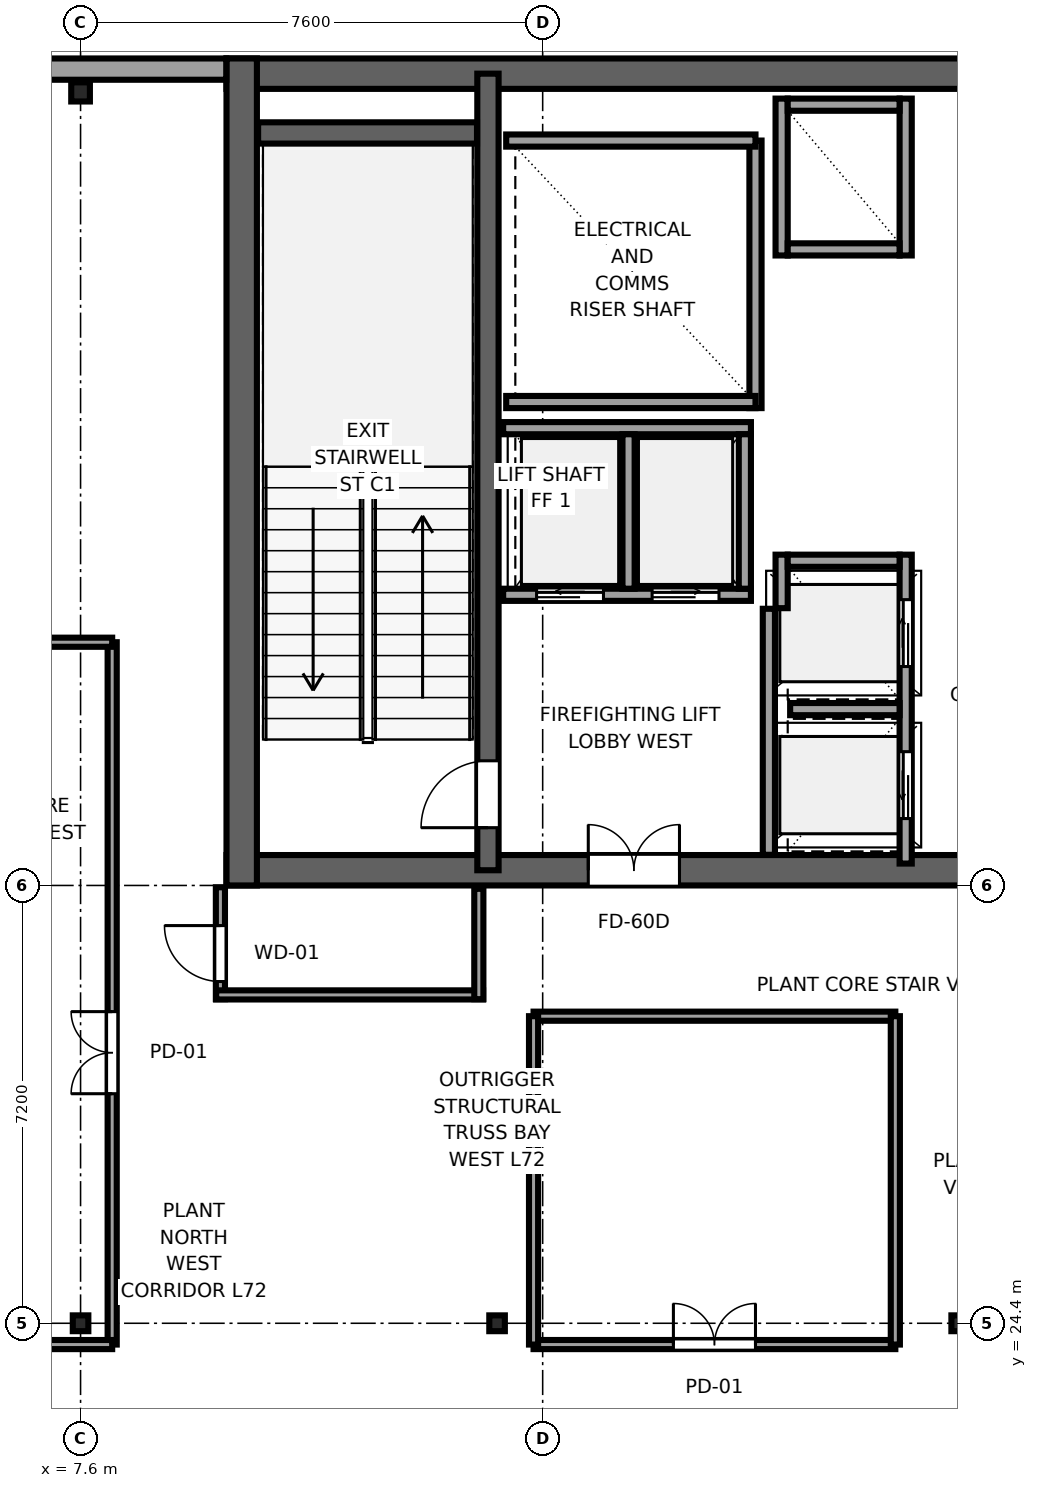
"""IFC4 building model, lengths in metres.
Left out: names, types, materials, properties, quantities, classifications, styles, units other than length and angle.
Written with IfcOpenShell. Run it as: python <this file> out.ifc"""

import sys

from ifc_helpers import new_model, si_unit, direction, frame, frame_2d, origin, origin_2d, place, context, subcontext, project, spatial, rectangle, i_section, extrude, source, transform, mapped, element, fill, save


model = new_model("IFC4")
c1 = context("Model", 3, precision=1e-05, world=origin(), true_north=direction((0.0, 1.0)))
c2 = subcontext(c1, "Body", "Model", "MODEL_VIEW")
j1 = project(units=[si_unit("LENGTHUNIT", "METRE"), si_unit("PLANEANGLEUNIT", "RADIAN")], contexts=[c1])
p1 = place(None, origin())
s1 = spatial("IfcSite", under=j1, at=p1, CompositionType="ELEMENT")
p2 = place(p1, origin())
s2 = spatial("IfcBuilding", under=s1, at=p2, CompositionType="ELEMENT")
p3 = place(p2, frame((0.0, 0.0, 270.05)))
s3 = spatial("IfcBuildingStorey", under=s2, at=p3, CompositionType="ELEMENT", Elevation=270.05)
p4 = place(p3, frame((10.0, 31.85, 0.0), z_axis=(0.0, 0.0, 1.0), x_axis=(1.0, 0.0, 0.0)))
e1 = element("IfcWall", 1, at=p4, inside=s3, PredefinedType="SHEAR", context=c2, shape_type="SweptSolid", body=[
    extrude(rectangle(XDim=26.0, YDim=0.5, at=frame_2d((13.0, 0.0))), origin(), (0.0, 0.0, 1.0), 5.0),
])
p5 = place(p4, frame((7.45, 0.0, 0.0), z_axis=(0.0, 0.0, 1.0), x_axis=(-1.0, 0.0, 0.0)))
e2 = element("IfcOpeningElement", 2, at=p5, cuts=e1, PredefinedType="OPENING", context=c2, shape_type="SweptSolid", body=[
    extrude(rectangle(XDim=1.5, YDim=2.04, at=frame_2d((0.75, 1.02))), frame((0.0, 0.26, 0.0), z_axis=(0.0, -1.0, 0.0), x_axis=(1.0, 0.0, 0.0)), (0.0, 0.0, 1.0), 0.52),
])
p6 = place(p4, frame((13.75, 0.0, 0.0), z_axis=(0.0, 0.0, 1.0), x_axis=(-1.0, 0.0, 0.0)))
e3 = element("IfcOpeningElement", 3, at=p6, cuts=e1, PredefinedType="OPENING", context=c2, shape_type="SweptSolid", body=[
    extrude(rectangle(XDim=1.5, YDim=2.04, at=frame_2d((0.75, 1.02))), frame((0.0, 0.26, 0.0), z_axis=(0.0, -1.0, 0.0), x_axis=(1.0, 0.0, 0.0)), (0.0, 0.0, 1.0), 0.52),
])
p7 = place(p4, frame((20.05, 0.0, 0.0), z_axis=(0.0, 0.0, 1.0), x_axis=(-1.0, 0.0, 0.0)))
e4 = element("IfcOpeningElement", 4, at=p7, cuts=e1, PredefinedType="OPENING", context=c2, shape_type="SweptSolid", body=[
    extrude(rectangle(XDim=1.5, YDim=2.04, at=frame_2d((0.75, 1.02))), frame((0.0, 0.26, 0.0), z_axis=(0.0, -1.0, 0.0), x_axis=(1.0, 0.0, 0.0)), (0.0, 0.0, 1.0), 0.52),
])
p8 = place(p3, frame((10.0, 44.95, 0.0), z_axis=(0.0, 0.0, 1.0), x_axis=(1.0, 0.0, 0.0)))
e5 = element("IfcWall", 5, at=p8, inside=s3, PredefinedType="SHEAR", context=c2, shape_type="SweptSolid", body=[
    extrude(rectangle(XDim=26.0, YDim=0.5, at=frame_2d((13.0, 0.0))), origin(), (0.0, 0.0, 1.0), 5.0),
])
p9 = place(p3, frame((10.25, 31.6, 0.0), z_axis=(0.0, 0.0, 1.0), x_axis=(0.0, 1.0, 0.0)))
e6 = element("IfcWall", 6, at=p9, inside=s3, PredefinedType="SHEAR", context=c2, shape_type="SweptSolid", body=[
    extrude(rectangle(XDim=13.6, YDim=0.5, at=frame_2d((6.8, 0.0))), origin(), (0.0, 0.0, 1.0), 5.0),
])
p10 = place(p3, frame((14.3, 31.85, 0.0), z_axis=(0.0, 0.0, 1.0), x_axis=(0.0, 1.0, 0.0)))
e7 = element("IfcWall", 7, at=p10, inside=s3, PredefinedType="SHEAR", context=c2, shape_type="SweptSolid", body=[
    extrude(rectangle(XDim=13.1, YDim=0.35, at=frame_2d((6.55, 0.0))), origin(), (0.0, 0.0, 1.0), 5.0),
])
p11 = place(p10, frame((0.7, 0.0, 0.0)))
e8 = element("IfcOpeningElement", 8, at=p11, cuts=e7, PredefinedType="OPENING", context=c2, shape_type="SweptSolid", body=[
    extrude(rectangle(XDim=1.1, YDim=2.12, at=frame_2d((0.55, 1.06))), frame((0.0, 0.185, 0.0), z_axis=(0.0, -1.0, 0.0), x_axis=(1.0, 0.0, 0.0)), (0.0, 0.0, 1.0), 0.37),
])
p12 = place(p3, frame((10.52, 43.975, 0.0), z_axis=(0.0, 0.0, 1.0), x_axis=(1.0, 0.0, 0.0)))
e9 = element("IfcWall", 9, at=p12, inside=s3, PredefinedType="SHEAR", context=c2, shape_type="SweptSolid", body=[
    extrude(rectangle(XDim=3.6, YDim=0.35, at=frame_2d((1.8, 0.0))), origin(), (0.0, 0.0, 1.0), 5.0),
])
m1 = source(origin(), c2, "Body", "SweptSolid", [
    extrude(i_section(OverallWidth=0.256, OverallDepth=0.26, WebThickness=0.01, FlangeThickness=0.017, FilletRadius=0.014, at=origin_2d()), origin(), (0.0, 0.0, 1.0), 5.0),
])
for number, where, z_axis, x_axis in (
    (10, (7.6, 24.4, 0.0), (0.0, 0.0, 1.0), (1.0, 0.0, 0.0)),
    (11, (14.45, 24.4, 0.0), (0.0, 0.0, 1.0), (1.0, 0.0, 0.0)),
    (12, (22.05, 24.4, 0.0), (0.0, 0.0, 1.0), (1.0, 0.0, 0.0)),
):
    element("IfcColumn", number, at=place(p3, frame(where, z_axis=z_axis, x_axis=x_axis)), inside=s3, PredefinedType="COLUMN", context=c2, shape_type="MappedRepresentation", body=[
        mapped(m1, transform((0.0, 0.0, 0.0), x_axis=(1.0, 0.0, 0.0), y_axis=(0.0, 1.0, 0.0), z_axis=(0.0, 0.0, 1.0), scale=1.0)),
    ])
m2 = source(origin(), c2, "Body", "SweptSolid", [
    extrude(i_section(OverallWidth=0.307, OverallDepth=0.315, WebThickness=0.012, FlangeThickness=0.019, FilletRadius=0.017, at=origin_2d()), origin(), (0.0, 0.0, 1.0), 5.0),
])
p13 = place(p3, frame((7.6, 44.65, 0.0), z_axis=(0.0, 0.0, 1.0), x_axis=(1.0, 0.0, 0.0)))
e13 = element("IfcColumn", 13, at=p13, inside=s3, PredefinedType="COLUMN", context=c2, shape_type="MappedRepresentation", body=[
    mapped(m2, transform((0.0, 0.0, 0.0), x_axis=(1.0, 0.0, 0.0), y_axis=(0.0, 1.0, 0.0), z_axis=(0.0, 0.0, 1.0), scale=1.0)),
])
p14 = place(p3, frame((9.996, 45.025, 0.0), z_axis=(0.0, 0.0, 1.0), x_axis=(-1.0, 0.0, 0.0)))
e14 = element("IfcWall", 14, at=p14, inside=s3, PredefinedType="SOLIDWALL", context=c2, shape_type="SweptSolid", body=[
    extrude(rectangle(XDim=2.979, YDim=0.35, at=frame_2d((1.49, 0.0))), origin(), (0.0, 0.0, 1.0), 3.57),
])
p15 = place(p3, frame((18.7, 39.45, 0.0), z_axis=(0.0, 0.0, 1.0), x_axis=(0.0, 1.0, 0.0)))
e15 = element("IfcWall", 15, at=p15, inside=s3, PredefinedType="SOLIDWALL", context=c2, shape_type="SweptSolid", body=[
    extrude(rectangle(XDim=4.4, YDim=0.2, at=frame_2d((2.2, 0.0))), origin(), (0.0, 0.0, 1.0), 4.78),
])
for number, where, z_axis, x_axis in (
    (16, (14.6, 39.55, 0.0), (0.0, 0.0, 1.0), (1.0, 0.0, 0.0)),
    (17, (14.6, 43.85, 0.0), (0.0, 0.0, 1.0), (1.0, 0.0, 0.0)),
):
    element("IfcWall", number, at=place(p3, frame(where, z_axis=z_axis, x_axis=x_axis)), inside=s3, PredefinedType="SOLIDWALL", context=c2, shape_type="SweptSolid", body=[
        extrude(rectangle(XDim=4.1, YDim=0.2, at=frame_2d((2.05, 0.0))), origin(), (0.0, 0.0, 1.0), 4.78),
    ])
p16 = place(p3, frame((18.92, 32.104, 0.0), z_axis=(0.0, 0.0, 1.0), x_axis=(0.0, 1.0, 0.0)))
e18 = element("IfcWall", 18, at=p16, inside=s3, PredefinedType="SOLIDWALL", context=c2, shape_type="SweptSolid", body=[
    extrude(rectangle(XDim=4.046, YDim=0.2, at=frame_2d((2.023, 0.0))), origin(), (0.0, 0.0, 1.0), 4.78),
])
p17 = place(p3, frame((21.17, 31.96, 0.0), z_axis=(0.0, 0.0, 1.0), x_axis=(0.0, 1.0, 0.0)))
e19 = element("IfcWall", 19, at=p17, inside=s3, PredefinedType="SOLIDWALL", context=c2, shape_type="SweptSolid", body=[
    extrude(rectangle(XDim=5.08, YDim=0.2, at=frame_2d((2.54, 0.0))), origin(), (0.0, 0.0, 1.0), 4.78),
])
p18 = place(p17, frame((0.74, 0.0, 0.0)))
e20 = element("IfcOpeningElement", 20, at=p18, cuts=e19, PredefinedType="OPENING", context=c2, shape_type="SweptSolid", body=[
    extrude(rectangle(XDim=1.1, YDim=2.12, at=frame_2d((0.55, 1.06))), frame((0.0, 0.11, 0.0), z_axis=(0.0, -1.0, 0.0), x_axis=(1.0, 0.0, 0.0)), (0.0, 0.0, 1.0), 0.22),
])
p19 = place(p17, frame((3.24, 0.0, 0.0)))
e21 = element("IfcOpeningElement", 21, at=p19, cuts=e19, PredefinedType="OPENING", context=c2, shape_type="SweptSolid", body=[
    extrude(rectangle(XDim=1.1, YDim=2.12, at=frame_2d((0.55, 1.06))), frame((0.0, 0.11, 0.0), z_axis=(0.0, -1.0, 0.0), x_axis=(1.0, 0.0, 0.0)), (0.0, 0.0, 1.0), 0.22),
])
p20 = place(p3, frame((19.13, 36.16, 0.0), z_axis=(0.0, 0.0, 1.0), x_axis=(0.0, 1.0, 0.0)))
e22 = element("IfcWall", 22, at=p20, inside=s3, PredefinedType="SOLIDWALL", context=c2, shape_type="SweptSolid", body=[
    extrude(rectangle(XDim=0.88, YDim=0.2, at=frame_2d((0.44, 0.0))), origin(), (0.0, 0.0, 1.0), 4.78),
])
p21 = place(p3, frame((19.23, 36.94, 0.0), z_axis=(0.0, 0.0, 1.0), x_axis=(1.0, 0.0, 0.0)))
e23 = element("IfcWall", 23, at=p21, inside=s3, PredefinedType="SOLIDWALL", context=c2, shape_type="SweptSolid", body=[
    extrude(rectangle(XDim=1.84, YDim=0.2, at=frame_2d((0.92, 0.0))), origin(), (0.0, 0.0, 1.0), 4.78),
])
p22 = place(p3, frame((19.27, 34.5, 0.0), z_axis=(0.0, 0.0, 1.0), x_axis=(1.0, 0.0, 0.0)))
e24 = element("IfcWall", 24, at=p22, inside=s3, PredefinedType="SOLIDWALL", context=c2, shape_type="SweptSolid", body=[
    extrude(rectangle(XDim=1.8, YDim=0.2, at=frame_2d((0.9, 0.0))), origin(), (0.0, 0.0, 1.0), 4.78),
])
for number, where, z_axis, x_axis in (
    (25, (21.17, 41.96, 0.0), (0.0, 0.0, 1.0), (0.0, 1.0, 0.0)),
    (26, (19.13, 41.96, 0.0), (0.0, 0.0, 1.0), (0.0, 1.0, 0.0)),
):
    element("IfcWall", number, at=place(p3, frame(where, z_axis=z_axis, x_axis=x_axis)), inside=s3, PredefinedType="SOLIDWALL", context=c2, shape_type="SweptSolid", body=[
        extrude(rectangle(XDim=2.58, YDim=0.2, at=frame_2d((1.29, 0.0))), origin(), (0.0, 0.0, 1.0), 4.78),
    ])
for number, where, z_axis, x_axis in (
    (27, (19.23, 42.06, 0.0), (0.0, 0.0, 1.0), (1.0, 0.0, 0.0)),
    (28, (19.23, 44.44, 0.0), (0.0, 0.0, 1.0), (1.0, 0.0, 0.0)),
):
    element("IfcWall", number, at=place(p3, frame(where, z_axis=z_axis, x_axis=x_axis)), inside=s3, PredefinedType="SOLIDWALL", context=c2, shape_type="SweptSolid", body=[
        extrude(rectangle(XDim=1.84, YDim=0.2, at=frame_2d((0.92, 0.0))), origin(), (0.0, 0.0, 1.0), 4.78),
    ])
p23 = place(p3, frame((14.55, 36.38, 0.0), z_axis=(0.0, 0.0, 1.0), x_axis=(1.0, 0.0, 0.0)))
e29 = element("IfcWall", 29, at=p23, inside=s3, PredefinedType="SOLIDWALL", context=c2, shape_type="SweptSolid", body=[
    extrude(rectangle(XDim=4.075, YDim=0.2, at=frame_2d((2.038, 0.0))), origin(), (0.0, 0.0, 1.0), 4.78),
])
p24 = place(p23, frame((0.55, 0.0, 0.0)))
e30 = element("IfcOpeningElement", 30, at=p24, cuts=e29, PredefinedType="OPENING", context=c2, shape_type="SweptSolid", body=[
    extrude(rectangle(XDim=1.1, YDim=2.12, at=frame_2d((0.55, 1.06))), frame((0.0, 0.11, 0.0), z_axis=(0.0, -1.0, 0.0), x_axis=(1.0, 0.0, 0.0)), (0.0, 0.0, 1.0), 0.22),
])
p25 = place(p23, frame((2.45, 0.0, 0.0)))
e31 = element("IfcOpeningElement", 31, at=p25, cuts=e29, PredefinedType="OPENING", context=c2, shape_type="SweptSolid", body=[
    extrude(rectangle(XDim=1.1, YDim=2.12, at=frame_2d((0.55, 1.06))), frame((0.0, 0.11, 0.0), z_axis=(0.0, -1.0, 0.0), x_axis=(1.0, 0.0, 0.0)), (0.0, 0.0, 1.0), 0.22),
])
p26 = place(p3, frame((14.55, 39.12, 0.0), z_axis=(0.0, 0.0, 1.0), x_axis=(1.0, 0.0, 0.0)))
e32 = element("IfcWall", 32, at=p26, inside=s3, PredefinedType="SOLIDWALL", context=c2, shape_type="SweptSolid", body=[
    extrude(rectangle(XDim=4.075, YDim=0.2, at=frame_2d((2.038, 0.0))), origin(), (0.0, 0.0, 1.0), 4.78),
])
for number, where, z_axis, x_axis in (
    (33, (18.525, 36.48, 0.0), (0.0, 0.0, 1.0), (0.0, 1.0, 0.0)),
    (34, (16.613, 36.48, 0.0), (0.0, 0.0, 1.0), (0.0, 1.0, 0.0)),
):
    element("IfcWall", number, at=place(p3, frame(where, z_axis=z_axis, x_axis=x_axis)), inside=s3, PredefinedType="SOLIDWALL", context=c2, shape_type="SweptSolid", body=[
        extrude(rectangle(XDim=2.54, YDim=0.2, at=frame_2d((1.27, 0.0))), origin(), (0.0, 0.0, 1.0), 4.78),
    ])
p27 = place(p3, frame((8.12, 24.05, 0.0), z_axis=(0.0, 0.0, 1.0), x_axis=(0.0, 1.0, 0.0)))
e35 = element("IfcWall", 35, at=p27, inside=s3, PredefinedType="PARTITIONING", context=c2, shape_type="SweptSolid", body=[
    extrude(rectangle(XDim=11.55, YDim=0.15, at=frame_2d((5.775, 0.0))), origin(), (0.0, 0.0, 1.0), 4.78),
])
p28 = place(p27, frame((4.125, 0.0, 0.0)))
e36 = element("IfcOpeningElement", 36, at=p28, cuts=e35, PredefinedType="OPENING", context=c2, shape_type="SweptSolid", body=[
    extrude(rectangle(XDim=1.35, YDim=2.15, at=frame_2d((0.675, 1.075))), frame((0.0, 0.085, 0.0), z_axis=(0.0, -1.0, 0.0), x_axis=(1.0, 0.0, 0.0)), (0.0, 0.0, 1.0), 0.17),
])
for number, where, z_axis, x_axis in (
    (37, (4.0, 24.05, 0.0), (0.0, 0.0, 1.0), (1.0, 0.0, 0.0)),
    (38, (4.0, 35.6, 0.0), (0.0, 0.0, 1.0), (1.0, 0.0, 0.0)),
):
    element("IfcWall", number, at=place(p3, frame(where, z_axis=z_axis, x_axis=x_axis)), inside=s3, PredefinedType="PARTITIONING", context=c2, shape_type="SweptSolid", body=[
        extrude(rectangle(XDim=4.12, YDim=0.15, at=frame_2d((2.06, 0.0))), origin(), (0.0, 0.0, 1.0), 4.78),
    ])
p29 = place(p3, frame((15.05, 24.05, 0.0), z_axis=(0.0, 0.0, 1.0), x_axis=(1.0, 0.0, 0.0)))
e39 = element("IfcWall", 39, at=p29, inside=s3, PredefinedType="PARTITIONING", context=c2, shape_type="SweptSolid", body=[
    extrude(rectangle(XDim=5.95, YDim=0.15, at=frame_2d((2.975, 0.0))), origin(), (0.0, 0.0, 1.0), 4.78),
])
p30 = place(p29, frame((2.3, 0.0, 0.0)))
e40 = element("IfcOpeningElement", 40, at=p30, cuts=e39, PredefinedType="OPENING", context=c2, shape_type="SweptSolid", body=[
    extrude(rectangle(XDim=1.35, YDim=2.15, at=frame_2d((0.675, 1.075))), frame((0.0, 0.085, 0.0), z_axis=(0.0, -1.0, 0.0), x_axis=(1.0, 0.0, 0.0)), (0.0, 0.0, 1.0), 0.17),
])
p31 = place(p3, frame((15.05, 29.45, 0.0), z_axis=(0.0, 0.0, 1.0), x_axis=(1.0, 0.0, 0.0)))
e41 = element("IfcWall", 41, at=p31, inside=s3, PredefinedType="PARTITIONING", context=c2, shape_type="SweptSolid", body=[
    extrude(rectangle(XDim=5.95, YDim=0.15, at=frame_2d((2.975, 0.0))), origin(), (0.0, 0.0, 1.0), 4.78),
])
for number, where, z_axis, x_axis in (
    (42, (15.05, 24.05, 0.0), (0.0, 0.0, 1.0), (0.0, 1.0, 0.0)),
    (43, (21.0, 24.05, 0.0), (0.0, 0.0, 1.0), (0.0, 1.0, 0.0)),
):
    element("IfcWall", number, at=place(p3, frame(where, z_axis=z_axis, x_axis=x_axis)), inside=s3, PredefinedType="PARTITIONING", context=c2, shape_type="SweptSolid", body=[
        extrude(rectangle(XDim=5.4, YDim=0.15, at=frame_2d((2.7, 0.0))), origin(), (0.0, 0.0, 1.0), 4.78),
    ])
p32 = place(p3, frame((9.9, 29.73, 0.0), z_axis=(0.0, 0.0, 1.0), x_axis=(0.0, 1.0, 0.0)))
e44 = element("IfcWall", 44, at=p32, inside=s3, PredefinedType="PARTITIONING", context=c2, shape_type="SweptSolid", body=[
    extrude(rectangle(XDim=1.84, YDim=0.15, at=frame_2d((0.92, 0.0))), origin(), (0.0, 0.0, 1.0), 4.78),
])
p33 = place(p32, frame((0.29, 0.0, 0.0)))
e45 = element("IfcOpeningElement", 45, at=p33, cuts=e44, PredefinedType="OPENING", context=c2, shape_type="SweptSolid", body=[
    extrude(rectangle(XDim=0.92, YDim=2.01, at=frame_2d((0.46, 1.005))), frame((0.0, 0.085, 0.0), z_axis=(0.0, -1.0, 0.0), x_axis=(1.0, 0.0, 0.0)), (0.0, 0.0, 1.0), 0.17),
])
p34 = place(p3, frame((9.83, 29.8, 0.0), z_axis=(0.0, 0.0, 1.0), x_axis=(1.0, 0.0, 0.0)))
e46 = element("IfcWall", 46, at=p34, inside=s3, PredefinedType="PARTITIONING", context=c2, shape_type="SweptSolid", body=[
    extrude(rectangle(XDim=4.39, YDim=0.15, at=frame_2d((2.195, 0.0))), origin(), (0.0, 0.0, 1.0), 4.78),
])
p35 = place(p3, frame((14.15, 29.73, 0.0), z_axis=(0.0, 0.0, 1.0), x_axis=(0.0, 1.0, 0.0)))
e47 = element("IfcWall", 47, at=p35, inside=s3, PredefinedType="PARTITIONING", context=c2, shape_type="SweptSolid", body=[
    extrude(rectangle(XDim=1.815, YDim=0.15, at=frame_2d((0.907, 0.0))), origin(), (0.0, 0.0, 1.0), 3.57),
])
m3 = source(origin(), c2, "Body", "SweptSolid", [
    extrude(rectangle(XDim=1.1, YDim=2.12, at=frame_2d((0.55, 1.06))), frame((0.0, 0.025, 0.0), z_axis=(0.0, -1.0, 0.0), x_axis=(1.0, 0.0, 0.0)), (0.0, 0.0, 1.0), 0.05),
])
p36 = place(p11, origin())
e48 = element("IfcDoor", 48, at=p36, inside=s3, OperationType="SINGLE_SWING_LEFT", PredefinedType="DOOR", context=c2, shape_type="MappedRepresentation", body=[
    mapped(m3, transform((0.0, 0.0, 0.0), x_axis=(1.0, 0.0, 0.0), y_axis=(0.0, 1.0, 0.0), z_axis=(0.0, 0.0, 1.0), scale=1.0)),
])
fill(e8, e48)
m4 = source(origin(), c2, "Body", "SweptSolid", [
    extrude(rectangle(XDim=1.5, YDim=2.04, at=frame_2d((0.75, 1.02))), frame((0.0, 0.025, 0.0), z_axis=(0.0, -1.0, 0.0), x_axis=(1.0, 0.0, 0.0)), (0.0, 0.0, 1.0), 0.05),
])
p37 = place(p5, origin())
e49 = element("IfcDoor", 49, at=p37, inside=s3, OperationType="DOUBLE_DOOR_SINGLE_SWING", PredefinedType="DOOR", context=c2, shape_type="MappedRepresentation", body=[
    mapped(m4, transform((0.0, 0.0, 0.0), x_axis=(1.0, 0.0, 0.0), y_axis=(0.0, 1.0, 0.0), z_axis=(0.0, 0.0, 1.0), scale=1.0)),
])
fill(e2, e49)
m5 = source(origin(), c2, "Body", "SweptSolid", [
    extrude(rectangle(XDim=1.1, YDim=2.12, at=frame_2d((0.55, 1.06))), frame((0.0, 0.025, 0.0), z_axis=(0.0, -1.0, 0.0), x_axis=(1.0, 0.0, 0.0)), (0.0, 0.0, 1.0), 0.05),
])
p38 = place(p18, origin())
e50 = element("IfcDoor", 50, at=p38, inside=s3, OperationType="SLIDING_TO_LEFT", PredefinedType="DOOR", context=c2, shape_type="MappedRepresentation", body=[
    mapped(m5, transform((0.0, 0.0, 0.0), x_axis=(1.0, 0.0, 0.0), y_axis=(0.0, 1.0, 0.0), z_axis=(0.0, 0.0, 1.0), scale=1.0)),
])
fill(e20, e50)
p39 = place(p19, origin())
e51 = element("IfcDoor", 51, at=p39, inside=s3, OperationType="SLIDING_TO_RIGHT", PredefinedType="DOOR", context=c2, shape_type="MappedRepresentation", body=[
    mapped(m5, transform((0.0, 0.0, 0.0), x_axis=(1.0, 0.0, 0.0), y_axis=(0.0, 1.0, 0.0), z_axis=(0.0, 0.0, 1.0), scale=1.0)),
])
fill(e21, e51)
p40 = place(p24, origin())
e52 = element("IfcDoor", 52, at=p40, inside=s3, OperationType="SLIDING_TO_LEFT", PredefinedType="DOOR", context=c2, shape_type="MappedRepresentation", body=[
    mapped(m5, transform((0.0, 0.0, 0.0), x_axis=(1.0, 0.0, 0.0), y_axis=(0.0, 1.0, 0.0), z_axis=(0.0, 0.0, 1.0), scale=1.0)),
])
fill(e30, e52)
p41 = place(p25, origin())
e53 = element("IfcDoor", 53, at=p41, inside=s3, OperationType="SLIDING_TO_RIGHT", PredefinedType="DOOR", context=c2, shape_type="MappedRepresentation", body=[
    mapped(m5, transform((0.0, 0.0, 0.0), x_axis=(1.0, 0.0, 0.0), y_axis=(0.0, 1.0, 0.0), z_axis=(0.0, 0.0, 1.0), scale=1.0)),
])
fill(e31, e53)
m6 = source(origin(), c2, "Body", "SweptSolid", [
    extrude(rectangle(XDim=1.35, YDim=2.15, at=frame_2d((0.675, 1.075))), frame((0.0, 0.025, 0.0), z_axis=(0.0, -1.0, 0.0), x_axis=(1.0, 0.0, 0.0)), (0.0, 0.0, 1.0), 0.05),
])
p42 = place(p28, origin())
e54 = element("IfcDoor", 54, at=p42, inside=s3, OperationType="DOUBLE_DOOR_SINGLE_SWING", PredefinedType="DOOR", context=c2, shape_type="MappedRepresentation", body=[
    mapped(m6, transform((0.0, 0.0, 0.0), x_axis=(1.0, 0.0, 0.0), y_axis=(0.0, 1.0, 0.0), z_axis=(0.0, 0.0, 1.0), scale=1.0)),
])
fill(e36, e54)
p43 = place(p30, origin())
e55 = element("IfcDoor", 55, at=p43, inside=s3, OperationType="DOUBLE_DOOR_SINGLE_SWING", PredefinedType="DOOR", context=c2, shape_type="MappedRepresentation", body=[
    mapped(m6, transform((0.0, 0.0, 0.0), x_axis=(1.0, 0.0, 0.0), y_axis=(0.0, 1.0, 0.0), z_axis=(0.0, 0.0, 1.0), scale=1.0)),
])
fill(e40, e55)
m7 = source(origin(), c2, "Body", "SweptSolid", [
    extrude(rectangle(XDim=0.92, YDim=2.01, at=frame_2d((0.46, 1.005))), frame((0.0, 0.025, 0.0), z_axis=(0.0, -1.0, 0.0), x_axis=(1.0, 0.0, 0.0)), (0.0, 0.0, 1.0), 0.05),
])
p44 = place(p33, origin())
e56 = element("IfcDoor", 56, at=p44, inside=s3, OperationType="SINGLE_SWING_RIGHT", PredefinedType="DOOR", context=c2, shape_type="MappedRepresentation", body=[
    mapped(m7, transform((0.0, 0.0, 0.0), x_axis=(1.0, 0.0, 0.0), y_axis=(0.0, 1.0, 0.0), z_axis=(0.0, 0.0, 1.0), scale=1.0)),
])
fill(e45, e56)
save(model, sys.argv[1])
